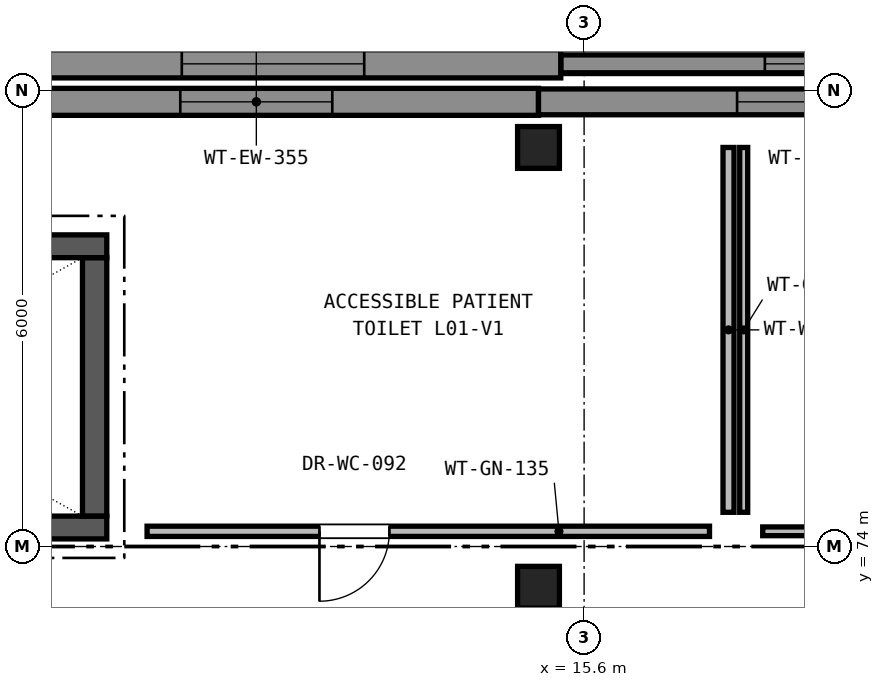
"""IFC4 building model, lengths in metres.
Left out: names, types, materials, properties, quantities, classifications, styles, units other than length and angle.
Written with IfcOpenShell. Run it as: python <this file> out.ifc"""

import sys

from ifc_helpers import new_model, si_unit, direction, frame, frame_2d, origin, origin_2d, place, context, subcontext, project, spatial, rectangle, extrude, element, fill, save


model = new_model("IFC4")
c1 = context("Model", 3, precision=1e-05, world=origin(), true_north=direction((0.0, 1.0)))
c2 = subcontext(c1, "Body", "Model", "MODEL_VIEW")
j1 = project(units=[si_unit("LENGTHUNIT", "METRE"), si_unit("PLANEANGLEUNIT", "RADIAN")], contexts=[c1])
p1 = place(None, origin())
s1 = spatial("IfcSite", under=j1, at=p1, CompositionType="ELEMENT")
p2 = place(p1, origin())
s2 = spatial("IfcBuilding", under=s1, at=p2, CompositionType="ELEMENT")
p3 = place(p2, frame((0.0, 0.0, 5.1)))
s3 = spatial("IfcBuildingStorey", under=s2, at=p3, CompositionType="ELEMENT", Elevation=5.1)
for number, where, z_axis, x_axis in (
    (1, (15.0, 73.464, 0.0), (0.0, 0.0, 1.0), (1.0, 0.0, 0.0)),
    (2, (15.0, 79.25, 0.0), (0.0, 0.0, 1.0), (1.0, 0.0, 0.0)),
):
    element("IfcColumn", number, at=place(p3, frame(where, z_axis=z_axis, x_axis=x_axis)), inside=s3, PredefinedType="COLUMN", context=c2, shape_type="SweptSolid", body=[
        extrude(rectangle(XDim=0.55, YDim=0.55, at=origin_2d()), origin(), (0.0, 0.0, 1.0), 4.42),
    ])
p4 = place(p3, frame((7.575, 79.85, 0.0), z_axis=(0.0, 0.0, 1.0), x_axis=(1.0, 0.0, 0.0)))
e3 = element("IfcWall", 3, at=p4, inside=s3, PredefinedType="SOLIDWALL", context=c2, shape_type="SweptSolid", body=[
    extrude(rectangle(XDim=7.425, YDim=0.355, at=frame_2d((3.712, 0.0))), origin(), (0.0, 0.0, 1.0), 4.12),
])
p5 = place(p4, frame((2.712, 0.0, 0.9)))
e4 = element("IfcOpeningElement", 4, at=p5, cuts=e3, PredefinedType="OPENING", context=c2, shape_type="SweptSolid", body=[
    extrude(rectangle(XDim=2.0, YDim=1.75, at=frame_2d((1.0, 0.875))), frame((0.0, 0.188, 0.0), z_axis=(0.0, -1.0, 0.0), x_axis=(1.0, 0.0, 0.0)), (0.0, 0.0, 1.0), 0.375),
])
p6 = place(p3, frame((15.0, 79.85, 0.0), z_axis=(0.0, 0.0, 1.0), x_axis=(1.0, 0.0, 0.0)))
e5 = element("IfcWall", 5, at=p6, inside=s3, PredefinedType="SOLIDWALL", context=c2, shape_type="SweptSolid", body=[
    extrude(rectangle(XDim=7.425, YDim=0.34, at=frame_2d((3.712, 0.0))), origin(), (0.0, 0.0, 1.0), 4.12),
])
p7 = place(p6, frame((2.613, 0.0, 0.9)))
e6 = element("IfcOpeningElement", 6, at=p7, cuts=e5, PredefinedType="OPENING", context=c2, shape_type="SweptSolid", body=[
    extrude(rectangle(XDim=2.2, YDim=1.75, at=frame_2d((1.1, 0.875))), frame((0.0, 0.18, 0.0), z_axis=(0.0, -1.0, 0.0), x_axis=(1.0, 0.0, 0.0)), (0.0, 0.0, 1.0), 0.36),
])
p8 = place(p3, frame((22.864, 80.35, 0.0), z_axis=(0.0, 0.0, 1.0), x_axis=(-1.0, 0.0, 0.0)))
e7 = element("IfcWall", 7, at=p8, inside=s3, PredefinedType="SOLIDWALL", context=c2, shape_type="SweptSolid", body=[
    extrude(rectangle(XDim=7.571, YDim=0.235, at=frame_2d((3.786, 0.0))), origin(), (0.0, 0.0, 1.0), 4.13),
])
p9 = place(p8, frame((2.686, 0.0, 0.9)))
e8 = element("IfcOpeningElement", 8, at=p9, cuts=e7, PredefinedType="OPENING", context=c2, shape_type="SweptSolid", body=[
    extrude(rectangle(XDim=2.2, YDim=1.75, at=frame_2d((1.1, 0.875))), frame((0.0, 0.127, 0.0), z_axis=(0.0, -1.0, 0.0), x_axis=(1.0, 0.0, 0.0)), (0.0, 0.0, 1.0), 0.255),
])
p10 = place(p3, frame((15.293, 80.35, 0.0), z_axis=(0.0, 0.0, 1.0), x_axis=(-1.0, 0.0, 0.0)))
e9 = element("IfcWall", 9, at=p10, inside=s3, PredefinedType="SOLIDWALL", context=c2, shape_type="SweptSolid", body=[
    extrude(rectangle(XDim=7.572, YDim=0.37, at=frame_2d((3.786, 0.0))), origin(), (0.0, 0.0, 1.0), 4.13),
])
p11 = place(p10, frame((2.586, 0.0, 0.9)))
e10 = element("IfcOpeningElement", 10, at=p11, cuts=e9, PredefinedType="OPENING", context=c2, shape_type="SweptSolid", body=[
    extrude(rectangle(XDim=2.4, YDim=1.75, at=frame_2d((1.2, 0.875))), frame((0.0, 0.195, 0.0), z_axis=(0.0, -1.0, 0.0), x_axis=(1.0, 0.0, 0.0)), (0.0, 0.0, 1.0), 0.39),
])
p12 = place(p3, frame((0.9, 74.25, 0.0), z_axis=(0.0, 0.0, 1.0), x_axis=(1.0, 0.0, 0.0)))
e11 = element("IfcWall", 11, at=p12, inside=s3, PredefinedType="SHEAR", context=c2, shape_type="SweptSolid", body=[
    extrude(rectangle(XDim=8.42, YDim=0.3, at=frame_2d((4.21, 0.0))), origin(), (0.0, 0.0, 1.0), 4.12),
])
p13 = place(p3, frame((0.9, 77.95, 0.0), z_axis=(0.0, 0.0, 1.0), x_axis=(1.0, 0.0, 0.0)))
e12 = element("IfcWall", 12, at=p13, inside=s3, PredefinedType="SHEAR", context=c2, shape_type="SweptSolid", body=[
    extrude(rectangle(XDim=8.42, YDim=0.3, at=frame_2d((4.21, 0.0))), origin(), (0.0, 0.0, 1.0), 4.12),
])
p14 = place(p13, frame((0.55, 0.0, 0.0)))
e13 = element("IfcOpeningElement", 13, at=p14, cuts=e12, PredefinedType="OPENING", context=c2, shape_type="SweptSolid", body=[
    extrude(rectangle(XDim=1.2, YDim=2.2, at=frame_2d((0.6, 1.1))), frame((0.0, 0.16, 0.0), z_axis=(0.0, -1.0, 0.0), x_axis=(1.0, 0.0, 0.0)), (0.0, 0.0, 1.0), 0.32),
])
p15 = place(p3, frame((9.16, 74.402, 0.0), z_axis=(0.0, 0.0, 1.0), x_axis=(0.0, 1.0, 0.0)))
e14 = element("IfcWall", 14, at=p15, inside=s3, PredefinedType="SHEAR", context=c2, shape_type="SweptSolid", body=[
    extrude(rectangle(XDim=3.396, YDim=0.32, at=frame_2d((1.698, 0.0))), origin(), (0.0, 0.0, 1.0), 4.12),
])
p16 = place(p3, frame((17.5, 79.25, 0.0), z_axis=(0.0, 0.0, 1.0), x_axis=(0.0, -1.0, 0.0)))
e15 = element("IfcWall", 15, at=p16, inside=s3, PredefinedType="PARTITIONING", context=c2, shape_type="SweptSolid", body=[
    extrude(rectangle(XDim=4.8, YDim=0.145, at=frame_2d((2.4, 0.0))), origin(), (0.0, 0.0, 1.0), 3.583),
])
p17 = place(p3, frame((17.25, 74.2, 0.0), z_axis=(0.0, 0.0, 1.0), x_axis=(-1.0, 0.0, 0.0)))
e16 = element("IfcWall", 16, at=p17, inside=s3, PredefinedType="PARTITIONING", context=c2, shape_type="SweptSolid", body=[
    extrude(rectangle(XDim=7.4, YDim=0.135, at=frame_2d((3.7, 0.0))), origin(), (0.0, 0.0, 1.0), 3.52),
])
p18 = place(p17, frame((4.212, 0.0, 0.0)))
e17 = element("IfcOpeningElement", 17, at=p18, cuts=e16, PredefinedType="OPENING", context=c2, shape_type="SweptSolid", body=[
    extrude(rectangle(XDim=0.92, YDim=2.12, at=frame_2d((0.46, 1.06))), frame((0.0, 0.077, 0.0), z_axis=(0.0, -1.0, 0.0), x_axis=(1.0, 0.0, 0.0)), (0.0, 0.0, 1.0), 0.155),
])
p19 = place(p3, frame((23.6, 74.2, 0.0), z_axis=(0.0, 0.0, 1.0), x_axis=(-1.0, 0.0, 0.0)))
e18 = element("IfcWall", 18, at=p19, inside=s3, PredefinedType="PARTITIONING", context=c2, shape_type="SweptSolid", body=[
    extrude(rectangle(XDim=5.65, YDim=0.115, at=frame_2d((2.825, 0.0))), origin(), (0.0, 0.0, 1.0), 3.47),
])
p20 = place(p3, frame((17.7, 74.45, 0.0), z_axis=(0.0, 0.0, 1.0), x_axis=(0.0, 1.0, 0.0)))
e19 = element("IfcWall", 19, at=p20, inside=s3, PredefinedType="PARTITIONING", context=c2, shape_type="SweptSolid", body=[
    extrude(rectangle(XDim=4.8, YDim=0.105, at=frame_2d((2.4, 0.0))), origin(), (0.0, 0.0, 1.0), 3.583),
])
p21 = place(p5, origin())
e20 = element("IfcWindow", 20, at=p21, inside=s3, PartitioningType="SINGLE_PANEL", PredefinedType="WINDOW", context=c2, shape_type="SweptSolid", body=[
    extrude(rectangle(XDim=2.0, YDim=1.75, at=frame_2d((1.0, 0.875))), frame((0.0, 0.03, 0.0), z_axis=(0.0, -1.0, 0.0), x_axis=(1.0, 0.0, 0.0)), (0.0, 0.0, 1.0), 0.06),
])
fill(e4, e20)
p22 = place(p7, origin())
e21 = element("IfcWindow", 21, at=p22, inside=s3, PartitioningType="SINGLE_PANEL", PredefinedType="WINDOW", context=c2, shape_type="SweptSolid", body=[
    extrude(rectangle(XDim=2.2, YDim=1.75, at=frame_2d((1.1, 0.875))), frame((0.0, 0.03, 0.0), z_axis=(0.0, -1.0, 0.0), x_axis=(1.0, 0.0, 0.0)), (0.0, 0.0, 1.0), 0.06),
])
fill(e6, e21)
p23 = place(p9, origin())
e22 = element("IfcWindow", 22, at=p23, inside=s3, PartitioningType="SINGLE_PANEL", PredefinedType="WINDOW", context=c2, shape_type="SweptSolid", body=[
    extrude(rectangle(XDim=2.2, YDim=1.75, at=frame_2d((1.1, 0.875))), frame((0.0, 0.03, 0.0), z_axis=(0.0, -1.0, 0.0), x_axis=(1.0, 0.0, 0.0)), (0.0, 0.0, 1.0), 0.06),
])
fill(e8, e22)
p24 = place(p11, origin())
e23 = element("IfcWindow", 23, at=p24, inside=s3, PartitioningType="SINGLE_PANEL", PredefinedType="WINDOW", context=c2, shape_type="SweptSolid", body=[
    extrude(rectangle(XDim=2.4, YDim=1.75, at=frame_2d((1.2, 0.875))), frame((0.0, 0.03, 0.0), z_axis=(0.0, -1.0, 0.0), x_axis=(1.0, 0.0, 0.0)), (0.0, 0.0, 1.0), 0.06),
])
fill(e10, e23)
p25 = place(p18, origin())
e24 = element("IfcDoor", 24, at=p25, inside=s3, OperationType="SINGLE_SWING_RIGHT", PredefinedType="DOOR", context=c2, shape_type="SweptSolid", body=[
    extrude(rectangle(XDim=0.92, YDim=2.12, at=frame_2d((0.46, 1.06))), frame((0.0, 0.025, 0.0), z_axis=(0.0, -1.0, 0.0), x_axis=(1.0, 0.0, 0.0)), (0.0, 0.0, 1.0), 0.05),
])
fill(e17, e24)
save(model, sys.argv[1])
